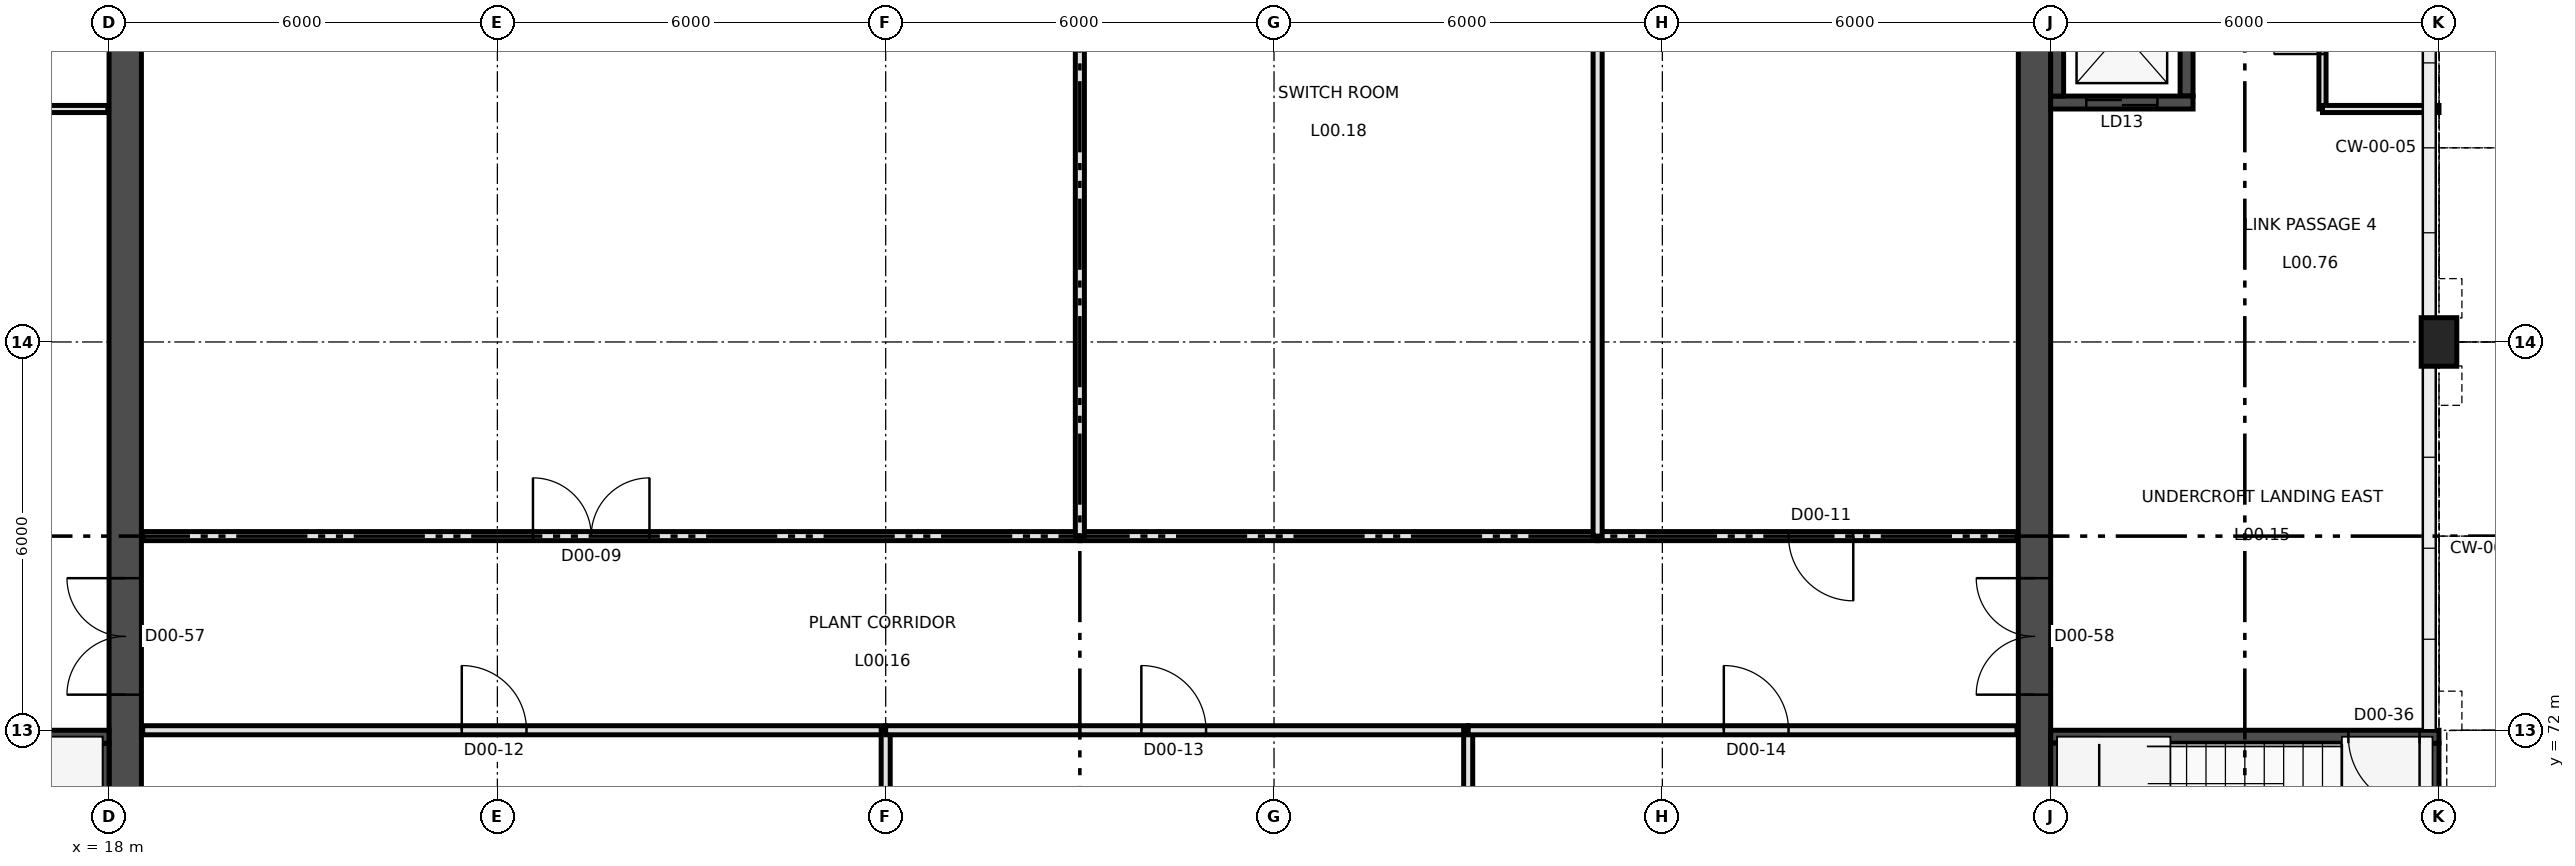
"""IFC4 building model, lengths in metres.
Left out: names, types, materials, properties, quantities, classifications, styles, units other than length and angle.
Written with IfcOpenShell. Run it as: python <this file> out.ifc"""

import sys

from ifc_helpers import new_model, si_unit, direction, frame, frame_2d, origin, origin_2d, place, context, subcontext, project, spatial, rectangle, extrude, element, fill, save


model = new_model("IFC4")
c1 = context("Model", 3, precision=1e-05, world=origin(), true_north=direction((0.0, 1.0)))
c2 = subcontext(c1, "Body", "Model", "MODEL_VIEW")
j1 = project(units=[si_unit("LENGTHUNIT", "METRE"), si_unit("PLANEANGLEUNIT", "RADIAN")], contexts=[c1])
p1 = place(None, origin())
s1 = spatial("IfcSite", under=j1, at=p1, CompositionType="ELEMENT")
p2 = place(p1, origin())
s2 = spatial("IfcBuilding", under=s1, at=p2, CompositionType="ELEMENT")
p3 = place(p2, origin())
s3 = spatial("IfcBuildingStorey", under=s2, at=p3, CompositionType="ELEMENT", Elevation=0.0)
p4 = place(p3, frame((54.0, 78.0, -0.3), z_axis=(0.0, 0.0, 1.0), x_axis=(1.0, 0.0, 0.0)))
e1 = element("IfcColumn", 1, at=p4, inside=s3, PredefinedType="COLUMN", context=c2, shape_type="SweptSolid", body=[
    extrude(rectangle(XDim=0.55, YDim=0.75, at=origin_2d()), origin(), (0.0, 0.0, 1.0), 7.3),
])
p5 = place(p3, frame((12.0, 71.9, -0.3), z_axis=(0.0, 0.0, 1.0), x_axis=(1.0, 0.0, 0.0)))
e2 = element("IfcWall", 2, at=p5, inside=s3, PredefinedType="SHEAR", context=c2, shape_type="SweptSolid", body=[
    extrude(rectangle(XDim=6.0, YDim=0.2, at=frame_2d((3.0, 0.0))), origin(), (0.0, 0.0, 1.0), 7.3),
])
p6 = place(p5, frame((0.3, 0.0, 0.3)))
e3 = element("IfcOpeningElement", 3, at=p6, cuts=e2, PredefinedType="OPENING", context=c2, shape_type="SweptSolid", body=[
    extrude(rectangle(XDim=1.1, YDim=2.2, at=frame_2d((0.55, 1.1))), frame((0.0, 0.11, 0.0), z_axis=(0.0, -1.0, 0.0), x_axis=(1.0, 0.0, 0.0)), (0.0, 0.0, 1.0), 0.22),
])
p7 = place(p3, frame((17.9, 66.2, -0.3), z_axis=(0.0, 0.0, 1.0), x_axis=(0.0, 1.0, 0.0)))
e4 = element("IfcWall", 4, at=p7, inside=s3, PredefinedType="SHEAR", context=c2, shape_type="SweptSolid", body=[
    extrude(rectangle(XDim=5.6, YDim=0.2, at=frame_2d((2.8, 0.0))), origin(), (0.0, 0.0, 1.0), 7.3),
])
p8 = place(p3, frame((48.0, 71.9, -0.3), z_axis=(0.0, 0.0, 1.0), x_axis=(1.0, 0.0, 0.0)))
e5 = element("IfcWall", 5, at=p8, inside=s3, PredefinedType="SHEAR", context=c2, shape_type="SweptSolid", body=[
    extrude(rectangle(XDim=6.0, YDim=0.2, at=frame_2d((3.0, 0.0))), origin(), (0.0, 0.0, 1.0), 7.3),
])
p9 = place(p8, frame((4.6, 0.0, 0.3)))
e6 = element("IfcOpeningElement", 6, at=p9, cuts=e5, PredefinedType="OPENING", context=c2, shape_type="SweptSolid", body=[
    extrude(rectangle(XDim=1.1, YDim=2.2, at=frame_2d((0.55, 1.1))), frame((0.0, 0.11, 0.0), z_axis=(0.0, -1.0, 0.0), x_axis=(1.0, 0.0, 0.0)), (0.0, 0.0, 1.0), 0.22),
])
p10 = place(p3, frame((48.1, 66.2, -0.3), z_axis=(0.0, 0.0, 1.0), x_axis=(0.0, 1.0, 0.0)))
e7 = element("IfcWall", 7, at=p10, inside=s3, PredefinedType="SHEAR", context=c2, shape_type="SweptSolid", body=[
    extrude(rectangle(XDim=5.6, YDim=0.2, at=frame_2d((2.8, 0.0))), origin(), (0.0, 0.0, 1.0), 7.3),
])
p11 = place(p3, frame((53.9, 66.2, -0.3), z_axis=(0.0, 0.0, 1.0), x_axis=(0.0, 1.0, 0.0)))
e8 = element("IfcWall", 8, at=p11, inside=s3, PredefinedType="SHEAR", context=c2, shape_type="SweptSolid", body=[
    extrude(rectangle(XDim=5.6, YDim=0.2, at=frame_2d((2.8, 0.0))), origin(), (0.0, 0.0, 1.0), 7.3),
])
p12 = place(p11, frame((1.9, 0.0, 0.3)))
e9 = element("IfcOpeningElement", 9, at=p12, cuts=e8, PredefinedType="OPENING", context=c2, shape_type="SweptSolid", body=[
    extrude(rectangle(XDim=1.8, YDim=2.4, at=frame_2d((0.9, 1.2))), frame((0.0, 0.11, 0.0), z_axis=(0.0, -1.0, 0.0), x_axis=(1.0, 0.0, 0.0)), (0.0, 0.0, 1.0), 0.22),
])
p13 = place(p3, frame((48.0, 81.7, -1.4), z_axis=(0.0, 0.0, 1.0), x_axis=(1.0, 0.0, 0.0)))
e10 = element("IfcWall", 10, at=p13, inside=s3, PredefinedType="SHEAR", context=c2, shape_type="SweptSolid", body=[
    extrude(rectangle(XDim=2.2, YDim=0.2, at=frame_2d((1.1, 0.0))), origin(), (0.0, 0.0, 1.0), 8.4),
])
p14 = place(p13, frame((0.55, 0.0, 1.4)))
e11 = element("IfcOpeningElement", 11, at=p14, cuts=e10, PredefinedType="OPENING", context=c2, shape_type="SweptSolid", body=[
    extrude(rectangle(XDim=1.1, YDim=2.1, at=frame_2d((0.55, 1.05))), frame((0.0, 0.11, 0.0), z_axis=(0.0, -1.0, 0.0), x_axis=(1.0, 0.0, 0.0)), (0.0, 0.0, 1.0), 0.22),
])
for number, where, z_axis, x_axis in (
    (12, (48.1, 81.8, -1.4), (0.0, 0.0, 1.0), (0.0, 1.0, 0.0)),
    (13, (50.1, 81.8, -1.4), (0.0, 0.0, 1.0), (0.0, 1.0, 0.0)),
):
    element("IfcWall", number, at=place(p3, frame(where, z_axis=z_axis, x_axis=x_axis)), inside=s3, PredefinedType="SHEAR", context=c2, shape_type="SweptSolid", body=[
        extrude(rectangle(XDim=2.0, YDim=0.2, at=frame_2d((1.0, 0.0))), origin(), (0.0, 0.0, 1.0), 8.4),
    ])
p15 = place(p3, frame((18.25, 54.5, -0.3), z_axis=(0.0, 0.0, 1.0), x_axis=(0.0, 1.0, 0.0)))
e14 = element("IfcWall", 14, at=p15, inside=s3, PredefinedType="SHEAR", context=c2, shape_type="SweptSolid", body=[
    extrude(rectangle(XDim=35.5, YDim=0.5, at=frame_2d((17.75, 0.0))), origin(), (0.0, 0.0, 1.0), 7.3),
])
p16 = place(p15, frame((1.55, 0.0, 0.3)))
e15 = element("IfcOpeningElement", 15, at=p16, cuts=e14, PredefinedType="OPENING", context=c2, shape_type="SweptSolid", body=[
    extrude(rectangle(XDim=1.8, YDim=2.1, at=frame_2d((0.9, 1.05))), frame((0.0, 0.26, 0.0), z_axis=(0.0, -1.0, 0.0), x_axis=(1.0, 0.0, 0.0)), (0.0, 0.0, 1.0), 0.52),
])
p17 = place(p15, frame((18.05, 0.0, 0.3)))
e16 = element("IfcOpeningElement", 16, at=p17, cuts=e14, PredefinedType="OPENING", context=c2, shape_type="SweptSolid", body=[
    extrude(rectangle(XDim=1.8, YDim=2.1, at=frame_2d((0.9, 1.05))), frame((0.0, 0.26, 0.0), z_axis=(0.0, -1.0, 0.0), x_axis=(1.0, 0.0, 0.0)), (0.0, 0.0, 1.0), 0.52),
])
p18 = place(p3, frame((47.75, 54.5, -0.3), z_axis=(0.0, 0.0, 1.0), x_axis=(0.0, 1.0, 0.0)))
e17 = element("IfcWall", 17, at=p18, inside=s3, PredefinedType="SHEAR", context=c2, shape_type="SweptSolid", body=[
    extrude(rectangle(XDim=35.5, YDim=0.5, at=frame_2d((17.75, 0.0))), origin(), (0.0, 0.0, 1.0), 7.3),
])
p19 = place(p18, frame((18.05, 0.0, 0.3)))
e18 = element("IfcOpeningElement", 18, at=p19, cuts=e17, PredefinedType="OPENING", context=c2, shape_type="SweptSolid", body=[
    extrude(rectangle(XDim=1.8, YDim=2.1, at=frame_2d((0.9, 1.05))), frame((0.0, 0.26, 0.0), z_axis=(0.0, -1.0, 0.0), x_axis=(1.0, 0.0, 0.0)), (0.0, 0.0, 1.0), 0.52),
])
p20 = place(p18, frame((3.6, 0.0, 0.3)))
e19 = element("IfcOpeningElement", 19, at=p20, cuts=e17, PredefinedType="OPENING", context=c2, shape_type="SweptSolid", body=[
    extrude(rectangle(XDim=1.0, YDim=2.1, at=frame_2d((0.5, 1.05))), frame((0.0, 0.26, 0.0), z_axis=(0.0, -1.0, 0.0), x_axis=(1.0, 0.0, 0.0)), (0.0, 0.0, 1.0), 0.52),
])
p21 = place(p3, frame((16.2, 81.6, 0.0), z_axis=(0.0, 0.0, 1.0), x_axis=(1.0, 0.0, 0.0)))
e20 = element("IfcWall", 20, at=p21, inside=s3, PredefinedType="PARTITIONING", context=c2, shape_type="SweptSolid", body=[
    extrude(rectangle(XDim=1.78, YDim=0.11, at=frame_2d((0.89, 0.0))), origin(), (0.0, 0.0, 1.0), 6.75),
])
p22 = place(p3, frame((52.2, 81.6, 0.0), z_axis=(0.0, 0.0, 1.0), x_axis=(0.0, 1.0, 0.0)))
e21 = element("IfcWall", 21, at=p22, inside=s3, PredefinedType="PARTITIONING", context=c2, shape_type="SweptSolid", body=[
    extrude(rectangle(XDim=2.4, YDim=0.11, at=frame_2d((1.2, 0.0))), origin(), (0.0, 0.0, 1.0), 6.15),
])
p23 = place(p22, frame((0.85, 0.0, 0.0)))
e22 = element("IfcOpeningElement", 22, at=p23, cuts=e21, PredefinedType="OPENING", context=c2, shape_type="SweptSolid", body=[
    extrude(rectangle(XDim=0.75, YDim=2.04, at=frame_2d((0.375, 1.02))), frame((0.0, 0.065, 0.0), z_axis=(0.0, -1.0, 0.0), x_axis=(1.0, 0.0, 0.0)), (0.0, 0.0, 1.0), 0.13),
])
p24 = place(p3, frame((52.2, 81.6, 0.0), z_axis=(0.0, 0.0, 1.0), x_axis=(1.0, 0.0, 0.0)))
e23 = element("IfcWall", 23, at=p24, inside=s3, PredefinedType="PARTITIONING", context=c2, shape_type="SweptSolid", body=[
    extrude(rectangle(XDim=1.8, YDim=0.11, at=frame_2d((0.9, 0.0))), origin(), (0.0, 0.0, 1.0), 6.05),
])
p25 = place(p3, frame((18.52, 75.0, 0.0), z_axis=(0.0, 0.0, 1.0), x_axis=(1.0, 0.0, 0.0)))
e24 = element("IfcWall", 24, at=p25, inside=s3, PredefinedType="PARTITIONING", context=c2, shape_type="SweptSolid", body=[
    extrude(rectangle(XDim=14.48, YDim=0.14, at=frame_2d((7.24, 0.0))), origin(), (0.0, 0.0, 1.0), 5.5),
])
p26 = place(p25, frame((6.03, 0.0, 0.0)))
e25 = element("IfcOpeningElement", 25, at=p26, cuts=e24, PredefinedType="OPENING", context=c2, shape_type="SweptSolid", body=[
    extrude(rectangle(XDim=1.8, YDim=2.1, at=frame_2d((0.9, 1.05))), frame((0.0, 0.08, 0.0), z_axis=(0.0, -1.0, 0.0), x_axis=(1.0, 0.0, 0.0)), (0.0, 0.0, 1.0), 0.16),
])
p27 = place(p3, frame((18.52, 72.0, 0.0), z_axis=(0.0, 0.0, 1.0), x_axis=(1.0, 0.0, 0.0)))
e26 = element("IfcWall", 26, at=p27, inside=s3, PredefinedType="PARTITIONING", context=c2, shape_type="SweptSolid", body=[
    extrude(rectangle(XDim=11.48, YDim=0.14, at=frame_2d((5.74, 0.0))), origin(), (0.0, 0.0, 1.0), 3.924),
])
p28 = place(p27, frame((4.93, 0.0, 0.0)))
e27 = element("IfcOpeningElement", 27, at=p28, cuts=e26, PredefinedType="OPENING", context=c2, shape_type="SweptSolid", body=[
    extrude(rectangle(XDim=1.0, YDim=2.1, at=frame_2d((0.5, 1.05))), frame((0.0, 0.08, 0.0), z_axis=(0.0, -1.0, 0.0), x_axis=(1.0, 0.0, 0.0)), (0.0, 0.0, 1.0), 0.16),
])
p29 = place(p3, frame((30.0, 60.0, 0.0), z_axis=(0.0, 0.0, 1.0), x_axis=(0.0, 1.0, 0.0)))
e28 = element("IfcWall", 28, at=p29, inside=s3, PredefinedType="PARTITIONING", context=c2, shape_type="SweptSolid", body=[
    extrude(rectangle(XDim=12.0, YDim=0.14, at=frame_2d((6.0, 0.0))), origin(), (0.0, 0.0, 1.0), 2.964),
])
p30 = place(p3, frame((30.0, 72.0, 0.0), z_axis=(0.0, 0.0, 1.0), x_axis=(1.0, 0.0, 0.0)))
e29 = element("IfcWall", 29, at=p30, inside=s3, PredefinedType="PARTITIONING", context=c2, shape_type="SweptSolid", body=[
    extrude(rectangle(XDim=9.0, YDim=0.14, at=frame_2d((4.5, 0.0))), origin(), (0.0, 0.0, 1.0), 3.924),
])
p31 = place(p30, frame((3.95, 0.0, 0.0)))
e30 = element("IfcOpeningElement", 30, at=p31, cuts=e29, PredefinedType="OPENING", context=c2, shape_type="SweptSolid", body=[
    extrude(rectangle(XDim=1.0, YDim=2.1, at=frame_2d((0.5, 1.05))), frame((0.0, 0.08, 0.0), z_axis=(0.0, -1.0, 0.0), x_axis=(1.0, 0.0, 0.0)), (0.0, 0.0, 1.0), 0.16),
])
p32 = place(p3, frame((33.0, 75.0, 0.0), z_axis=(0.0, 0.0, 1.0), x_axis=(1.0, 0.0, 0.0)))
e31 = element("IfcWall", 31, at=p32, inside=s3, PredefinedType="PARTITIONING", context=c2, shape_type="SweptSolid", body=[
    extrude(rectangle(XDim=8.0, YDim=0.14, at=frame_2d((4.0, 0.0))), origin(), (0.0, 0.0, 1.0), 5.5),
])
p33 = place(p3, frame((33.0, 75.0, 0.0), z_axis=(0.0, 0.0, 1.0), x_axis=(0.0, 1.0, 0.0)))
e32 = element("IfcWall", 32, at=p33, inside=s3, PredefinedType="PARTITIONING", context=c2, shape_type="SweptSolid", body=[
    extrude(rectangle(XDim=14.68, YDim=0.14, at=frame_2d((7.34, 0.0))), origin(), (0.0, 0.0, 1.0), 4.404),
])
p34 = place(p3, frame((39.0, 60.0, 0.0), z_axis=(0.0, 0.0, 1.0), x_axis=(0.0, 1.0, 0.0)))
e33 = element("IfcWall", 33, at=p34, inside=s3, PredefinedType="PARTITIONING", context=c2, shape_type="SweptSolid", body=[
    extrude(rectangle(XDim=12.0, YDim=0.14, at=frame_2d((6.0, 0.0))), origin(), (0.0, 0.0, 1.0), 2.964),
])
p35 = place(p3, frame((39.0, 72.0, 0.0), z_axis=(0.0, 0.0, 1.0), x_axis=(1.0, 0.0, 0.0)))
e34 = element("IfcWall", 34, at=p35, inside=s3, PredefinedType="PARTITIONING", context=c2, shape_type="SweptSolid", body=[
    extrude(rectangle(XDim=8.48, YDim=0.14, at=frame_2d((4.24, 0.0))), origin(), (0.0, 0.0, 1.0), 3.924),
])
p36 = place(p35, frame((3.95, 0.0, 0.0)))
e35 = element("IfcOpeningElement", 35, at=p36, cuts=e34, PredefinedType="OPENING", context=c2, shape_type="SweptSolid", body=[
    extrude(rectangle(XDim=1.0, YDim=2.1, at=frame_2d((0.5, 1.05))), frame((0.0, 0.08, 0.0), z_axis=(0.0, -1.0, 0.0), x_axis=(1.0, 0.0, 0.0)), (0.0, 0.0, 1.0), 0.16),
])
p37 = place(p3, frame((41.0, 75.0, 0.0), z_axis=(0.0, 0.0, 1.0), x_axis=(1.0, 0.0, 0.0)))
e36 = element("IfcWall", 36, at=p37, inside=s3, PredefinedType="PARTITIONING", context=c2, shape_type="SweptSolid", body=[
    extrude(rectangle(XDim=6.48, YDim=0.14, at=frame_2d((3.24, 0.0))), origin(), (0.0, 0.0, 1.0), 5.5),
])
p38 = place(p37, frame((2.95, 0.0, 0.0)))
e37 = element("IfcOpeningElement", 37, at=p38, cuts=e36, PredefinedType="OPENING", context=c2, shape_type="SweptSolid", body=[
    extrude(rectangle(XDim=1.0, YDim=2.1, at=frame_2d((0.5, 1.05))), frame((0.0, 0.08, 0.0), z_axis=(0.0, -1.0, 0.0), x_axis=(1.0, 0.0, 0.0)), (0.0, 0.0, 1.0), 0.16),
])
p39 = place(p3, frame((41.0, 75.0, 0.0), z_axis=(0.0, 0.0, 1.0), x_axis=(0.0, 1.0, 0.0)))
e38 = element("IfcWall", 38, at=p39, inside=s3, PredefinedType="PARTITIONING", context=c2, shape_type="SweptSolid", body=[
    extrude(rectangle(XDim=14.68, YDim=0.14, at=frame_2d((7.34, 0.0))), origin(), (0.0, 0.0, 1.0), 4.404),
])
p40 = place(p26, origin())
e39 = element("IfcDoor", 39, at=p40, inside=s3, OperationType="DOUBLE_DOOR_SINGLE_SWING", PredefinedType="DOOR", context=c2, shape_type="SweptSolid", body=[
    extrude(rectangle(XDim=1.8, YDim=2.1, at=frame_2d((0.9, 1.05))), frame((0.0, 0.025, 0.0), z_axis=(0.0, -1.0, 0.0), x_axis=(1.0, 0.0, 0.0)), (0.0, 0.0, 1.0), 0.05),
])
fill(e25, e39)
p41 = place(p38, origin())
e40 = element("IfcDoor", 40, at=p41, inside=s3, OperationType="SINGLE_SWING_RIGHT", PredefinedType="DOOR", context=c2, shape_type="SweptSolid", body=[
    extrude(rectangle(XDim=1.0, YDim=2.1, at=frame_2d((0.5, 1.05))), frame((0.0, 0.025, 0.0), z_axis=(0.0, -1.0, 0.0), x_axis=(1.0, 0.0, 0.0)), (0.0, 0.0, 1.0), 0.05),
])
fill(e37, e40)
p42 = place(p28, frame((1.0, 0.0, 0.0), z_axis=(0.0, 0.0, 1.0), x_axis=(-1.0, 0.0, 0.0)))
e41 = element("IfcDoor", 41, at=p42, inside=s3, OperationType="SINGLE_SWING_LEFT", PredefinedType="DOOR", context=c2, shape_type="SweptSolid", body=[
    extrude(rectangle(XDim=1.0, YDim=2.1, at=frame_2d((0.5, 1.05))), frame((0.0, 0.025, 0.0), z_axis=(0.0, -1.0, 0.0), x_axis=(1.0, 0.0, 0.0)), (0.0, 0.0, 1.0), 0.05),
])
fill(e27, e41)
p43 = place(p31, frame((1.0, 0.0, 0.0), z_axis=(0.0, 0.0, 1.0), x_axis=(-1.0, 0.0, 0.0)))
e42 = element("IfcDoor", 42, at=p43, inside=s3, OperationType="SINGLE_SWING_LEFT", PredefinedType="DOOR", context=c2, shape_type="SweptSolid", body=[
    extrude(rectangle(XDim=1.0, YDim=2.1, at=frame_2d((0.5, 1.05))), frame((0.0, 0.025, 0.0), z_axis=(0.0, -1.0, 0.0), x_axis=(1.0, 0.0, 0.0)), (0.0, 0.0, 1.0), 0.05),
])
fill(e30, e42)
p44 = place(p36, frame((1.0, 0.0, 0.0), z_axis=(0.0, 0.0, 1.0), x_axis=(-1.0, 0.0, 0.0)))
e43 = element("IfcDoor", 43, at=p44, inside=s3, OperationType="SINGLE_SWING_LEFT", PredefinedType="DOOR", context=c2, shape_type="SweptSolid", body=[
    extrude(rectangle(XDim=1.0, YDim=2.1, at=frame_2d((0.5, 1.05))), frame((0.0, 0.025, 0.0), z_axis=(0.0, -1.0, 0.0), x_axis=(1.0, 0.0, 0.0)), (0.0, 0.0, 1.0), 0.05),
])
fill(e35, e43)
p45 = place(p9, frame((1.1, 0.0, 0.0), z_axis=(0.0, 0.0, 1.0), x_axis=(-1.0, 0.0, 0.0)))
e44 = element("IfcDoor", 44, at=p45, inside=s3, OperationType="SINGLE_SWING_RIGHT", PredefinedType="DOOR", context=c2, shape_type="SweptSolid", body=[
    extrude(rectangle(XDim=1.1, YDim=2.2, at=frame_2d((0.55, 1.1))), frame((0.0, 0.025, 0.0), z_axis=(0.0, -1.0, 0.0), x_axis=(1.0, 0.0, 0.0)), (0.0, 0.0, 1.0), 0.05),
])
fill(e6, e44)
p46 = place(p23, frame((0.75, 0.0, 0.0), z_axis=(0.0, 0.0, 1.0), x_axis=(-1.0, 0.0, 0.0)))
e45 = element("IfcDoor", 45, at=p46, inside=s3, OperationType="SINGLE_SWING_LEFT", PredefinedType="DOOR", context=c2, shape_type="SweptSolid", body=[
    extrude(rectangle(XDim=0.75, YDim=2.04, at=frame_2d((0.375, 1.02))), frame((0.0, 0.025, 0.0), z_axis=(0.0, -1.0, 0.0), x_axis=(1.0, 0.0, 0.0)), (0.0, 0.0, 1.0), 0.05),
])
fill(e22, e45)
p47 = place(p17, frame((1.8, 0.0, 0.0), z_axis=(0.0, 0.0, 1.0), x_axis=(-1.0, 0.0, 0.0)))
e46 = element("IfcDoor", 46, at=p47, inside=s3, OperationType="DOUBLE_DOOR_SINGLE_SWING", PredefinedType="DOOR", context=c2, shape_type="SweptSolid", body=[
    extrude(rectangle(XDim=1.8, YDim=2.1, at=frame_2d((0.9, 1.05))), frame((0.0, 0.025, 0.0), z_axis=(0.0, -1.0, 0.0), x_axis=(1.0, 0.0, 0.0)), (0.0, 0.0, 1.0), 0.05),
])
fill(e16, e46)
p48 = place(p19, origin())
e47 = element("IfcDoor", 47, at=p48, inside=s3, OperationType="DOUBLE_DOOR_SINGLE_SWING", PredefinedType="DOOR", context=c2, shape_type="SweptSolid", body=[
    extrude(rectangle(XDim=1.8, YDim=2.1, at=frame_2d((0.9, 1.05))), frame((0.0, 0.025, 0.0), z_axis=(0.0, -1.0, 0.0), x_axis=(1.0, 0.0, 0.0)), (0.0, 0.0, 1.0), 0.05),
])
fill(e18, e47)
p49 = place(p14, origin())
e48 = element("IfcDoor", 48, at=p49, inside=s3, OperationType="DOUBLE_DOOR_SLIDING", PredefinedType="DOOR", context=c2, shape_type="SweptSolid", body=[
    extrude(rectangle(XDim=1.1, YDim=2.1, at=frame_2d((0.55, 1.05))), frame((0.0, 0.025, 0.0), z_axis=(0.0, -1.0, 0.0), x_axis=(1.0, 0.0, 0.0)), (0.0, 0.0, 1.0), 0.05),
])
fill(e11, e48)
save(model, sys.argv[1])
